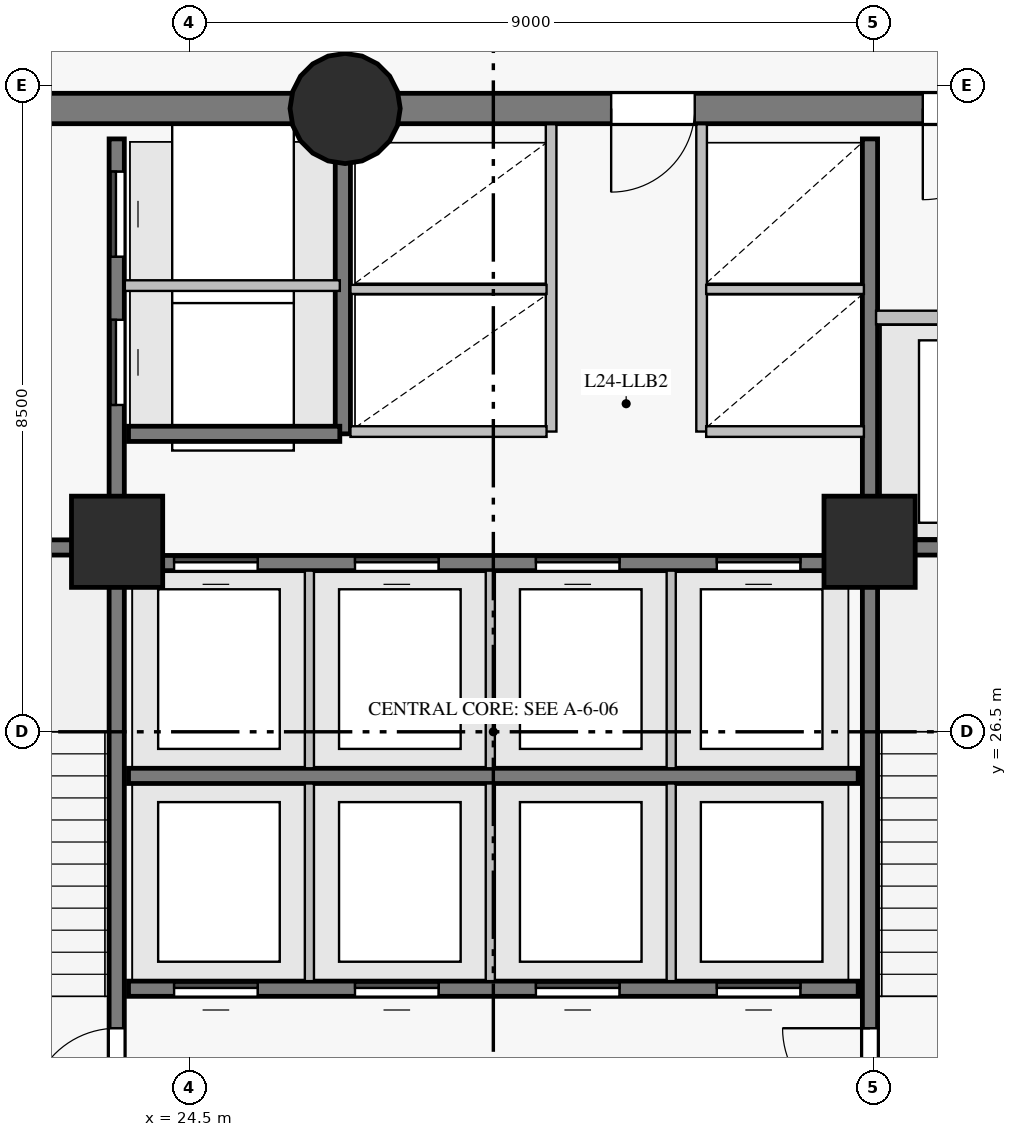
"""IFC4 building model, lengths in metres.
Left out: names, types, materials, properties, quantities, classifications, styles, units other than length and angle.
Written with IfcOpenShell. Run it as: python <this file> out.ifc"""

import sys

from ifc_helpers import new_model, si_unit, direction, frame, frame_2d, origin, origin_with_axes, origin_2d, place, context, subcontext, project, spatial, rectangle, circle, extrude, source, transform, mapped, element, fill, save


model = new_model("IFC4")
c1 = context("Model", 3, precision=1e-05, world=origin(), true_north=direction((0.0, 1.0)))
c2 = subcontext(c1, "Body", "Model", "MODEL_VIEW")
j1 = project(units=[si_unit("LENGTHUNIT", "METRE"), si_unit("PLANEANGLEUNIT", "RADIAN")], contexts=[c1])
p1 = place(None, origin())
s1 = spatial("IfcSite", under=j1, at=p1, CompositionType="ELEMENT")
p2 = place(p1, origin())
s2 = spatial("IfcBuilding", under=s1, at=p2, CompositionType="ELEMENT")
p3 = place(p2, frame((0.0, 0.0, 92.2)))
s3 = spatial("IfcBuildingStorey", under=s2, at=p3, CompositionType="ELEMENT", Elevation=92.2)
p4 = place(p3, frame((37.5, 34.7, 0.0), z_axis=(0.0, 0.0, 1.0), x_axis=(-1.0, 0.0, 0.0)))
e1 = element("IfcWall", 1, at=p4, inside=s3, PredefinedType="SHEAR", context=c2, shape_type="SweptSolid", body=[
    extrude(rectangle(XDim=10.95, YDim=0.4, at=frame_2d((5.475, 0.0))), origin(), (0.0, 0.0, 1.0), 3.775),
])
p5 = place(p4, frame((2.15, 0.0, 0.0)))
e2 = element("IfcOpeningElement", 2, at=p5, cuts=e1, PredefinedType="OPENING", context=c2, shape_type="SweptSolid", body=[
    extrude(rectangle(XDim=1.2, YDim=2.15, at=frame_2d((0.6, 1.075))), frame((0.0, 0.21, 0.0), z_axis=(0.0, -1.0, 0.0), x_axis=(1.0, 0.0, 0.0)), (0.0, 0.0, 1.0), 0.42),
])
p6 = place(p4, frame((6.35, 0.0, 0.0)))
e3 = element("IfcOpeningElement", 3, at=p6, cuts=e1, PredefinedType="OPENING", context=c2, shape_type="SweptSolid", body=[
    extrude(rectangle(XDim=1.1, YDim=2.15, at=frame_2d((0.55, 1.075))), frame((0.0, 0.21, 0.0), z_axis=(0.0, -1.0, 0.0), x_axis=(1.0, 0.0, 0.0)), (0.0, 0.0, 1.0), 0.42),
])
p7 = place(p3, frame((26.55, 34.7, 0.0), z_axis=(0.0, 0.0, 1.0), x_axis=(-1.0, 0.0, 0.0)))
e4 = element("IfcWall", 4, at=p7, inside=s3, PredefinedType="SHEAR", context=c2, shape_type="SweptSolid", body=[
    extrude(rectangle(XDim=7.05, YDim=0.4, at=frame_2d((3.525, 0.0))), origin(), (0.0, 0.0, 1.0), 3.775),
])
p8 = place(p7, frame((4.25, 0.0, 0.0)))
e5 = element("IfcOpeningElement", 5, at=p8, cuts=e4, PredefinedType="OPENING", context=c2, shape_type="SweptSolid", body=[
    extrude(rectangle(XDim=1.1, YDim=2.15, at=frame_2d((0.55, 1.075))), frame((0.0, 0.21, 0.0), z_axis=(0.0, -1.0, 0.0), x_axis=(1.0, 0.0, 0.0)), (0.0, 0.0, 1.0), 0.42),
])
m1 = source(origin_with_axes(), c2, "Body", "SweptSolid", [
    extrude(circle(Radius=0.725, at=origin_2d()), origin(), (0.0, 0.0, 1.0), 4.0),
])
p9 = place(p3, frame((26.55, 34.7, 0.0), z_axis=(0.0, 0.0, 1.0), x_axis=(1.0, 0.0, 0.0)))
e6 = element("IfcColumn", 6, at=p9, inside=s3, PredefinedType="COLUMN", context=c2, shape_type="MappedRepresentation", body=[
    mapped(m1, transform((0.0, 0.0, 0.0), scale=1.0)),
])
m2 = source(origin_with_axes(), c2, "Body", "SweptSolid", [
    extrude(rectangle(XDim=1.2, YDim=1.2, at=origin_2d()), origin(), (0.0, 0.0, 1.0), 4.0),
])
for number, where, z_axis, x_axis in (
    (7, (23.55, 29.0, 0.0), (0.0, 0.0, 1.0), (1.0, 0.0, 0.0)),
    (8, (33.45, 29.0, 0.0), (0.0, 0.0, 1.0), (1.0, 0.0, 0.0)),
):
    element("IfcColumn", number, at=place(p3, frame(where, z_axis=z_axis, x_axis=x_axis)), inside=s3, PredefinedType="COLUMN", context=c2, shape_type="MappedRepresentation", body=[
        mapped(m2, transform((0.0, 0.0, 0.0), scale=1.0)),
    ])
p10 = place(p3, frame((23.545, 18.7, 0.0), z_axis=(0.0, 0.0, 1.0), x_axis=(0.0, 1.0, 0.0)))
e9 = element("IfcWall", 9, at=p10, inside=s3, PredefinedType="SHEAR", context=c2, shape_type="SweptSolid", body=[
    extrude(rectangle(XDim=15.6, YDim=0.2, at=frame_2d((7.8, 0.0))), origin(), (0.0, 0.0, 1.0), 3.775),
])
p11 = place(p10, frame((2.75, 0.0, 0.0)))
e10 = element("IfcOpeningElement", 10, at=p11, cuts=e9, PredefinedType="OPENING", context=c2, shape_type="SweptSolid", body=[
    extrude(rectangle(XDim=1.15, YDim=2.15, at=frame_2d((0.575, 1.075))), frame((0.0, 0.11, 0.0), z_axis=(0.0, -1.0, 0.0), x_axis=(1.0, 0.0, 0.0)), (0.0, 0.0, 1.0), 0.22),
])
p12 = place(p10, frame((0.14, 0.0, 0.0)))
e11 = element("IfcOpeningElement", 11, at=p12, cuts=e9, PredefinedType="OPENING", context=c2, shape_type="SweptSolid", body=[
    extrude(rectangle(XDim=0.88, YDim=2.1, at=frame_2d((0.44, 1.05))), frame((0.0, 0.11, 0.0), z_axis=(0.0, -1.0, 0.0), x_axis=(1.0, 0.0, 0.0)), (0.0, 0.0, 1.0), 0.22),
])
p13 = place(p10, frame((1.36, 0.0, 0.0)))
e12 = element("IfcOpeningElement", 12, at=p13, cuts=e9, PredefinedType="OPENING", context=c2, shape_type="SweptSolid", body=[
    extrude(rectangle(XDim=0.88, YDim=2.1, at=frame_2d((0.44, 1.05))), frame((0.0, 0.11, 0.0), z_axis=(0.0, -1.0, 0.0), x_axis=(1.0, 0.0, 0.0)), (0.0, 0.0, 1.0), 0.22),
])
p14 = place(p10, frame((12.1, 0.0, 0.0)))
e13 = element("IfcOpeningElement", 13, at=p14, cuts=e9, PredefinedType="OPENING", context=c2, shape_type="SweptSolid", body=[
    extrude(rectangle(XDim=1.12, YDim=2.15, at=frame_2d((0.56, 1.075))), frame((0.0, 0.11, 0.0), z_axis=(0.0, -1.0, 0.0), x_axis=(1.0, 0.0, 0.0)), (0.0, 0.0, 1.0), 0.22),
])
p15 = place(p10, frame((14.05, 0.0, 0.0)))
e14 = element("IfcOpeningElement", 14, at=p15, cuts=e9, PredefinedType="OPENING", context=c2, shape_type="SweptSolid", body=[
    extrude(rectangle(XDim=1.12, YDim=2.15, at=frame_2d((0.56, 1.075))), frame((0.0, 0.11, 0.0), z_axis=(0.0, -1.0, 0.0), x_axis=(1.0, 0.0, 0.0)), (0.0, 0.0, 1.0), 0.22),
])
p16 = place(p3, frame((33.455, 18.7, 0.0), z_axis=(0.0, 0.0, 1.0), x_axis=(0.0, 1.0, 0.0)))
e15 = element("IfcWall", 15, at=p16, inside=s3, PredefinedType="SHEAR", context=c2, shape_type="SweptSolid", body=[
    extrude(rectangle(XDim=15.6, YDim=0.2, at=frame_2d((7.8, 0.0))), origin(), (0.0, 0.0, 1.0), 3.775),
])
p17 = place(p16, frame((2.75, 0.0, 0.0)))
e16 = element("IfcOpeningElement", 16, at=p17, cuts=e15, PredefinedType="OPENING", context=c2, shape_type="SweptSolid", body=[
    extrude(rectangle(XDim=1.15, YDim=2.15, at=frame_2d((0.575, 1.075))), frame((0.0, 0.11, 0.0), z_axis=(0.0, -1.0, 0.0), x_axis=(1.0, 0.0, 0.0)), (0.0, 0.0, 1.0), 0.22),
])
p18 = place(p16, frame((0.55, 0.0, 0.0)))
e17 = element("IfcOpeningElement", 17, at=p18, cuts=e15, PredefinedType="OPENING", context=c2, shape_type="SweptSolid", body=[
    extrude(rectangle(XDim=0.94, YDim=2.1, at=frame_2d((0.47, 1.05))), frame((0.0, 0.11, 0.0), z_axis=(0.0, -1.0, 0.0), x_axis=(1.0, 0.0, 0.0)), (0.0, 0.0, 1.0), 0.22),
])
p19 = place(p3, frame((23.7, 23.12, 0.0), z_axis=(0.0, 0.0, 1.0), x_axis=(1.0, 0.0, 0.0)))
e18 = element("IfcWall", 18, at=p19, inside=s3, PredefinedType="SHEAR", context=c2, shape_type="SweptSolid", body=[
    extrude(rectangle(XDim=9.6, YDim=0.2, at=frame_2d((4.8, 0.0))), origin(), (0.0, 0.0, 1.0), 3.775),
])
p20 = place(p19, frame((0.6, 0.0, 0.0)))
e19 = element("IfcOpeningElement", 19, at=p20, cuts=e18, PredefinedType="OPENING", context=c2, shape_type="SweptSolid", body=[
    extrude(rectangle(XDim=1.1, YDim=2.15, at=frame_2d((0.55, 1.075))), frame((0.0, 0.11, 0.0), z_axis=(0.0, -1.0, 0.0), x_axis=(1.0, 0.0, 0.0)), (0.0, 0.0, 1.0), 0.22),
])
p21 = place(p19, frame((2.98, 0.0, 0.0)))
e20 = element("IfcOpeningElement", 20, at=p21, cuts=e18, PredefinedType="OPENING", context=c2, shape_type="SweptSolid", body=[
    extrude(rectangle(XDim=1.1, YDim=2.15, at=frame_2d((0.55, 1.075))), frame((0.0, 0.11, 0.0), z_axis=(0.0, -1.0, 0.0), x_axis=(1.0, 0.0, 0.0)), (0.0, 0.0, 1.0), 0.22),
])
p22 = place(p19, frame((5.36, 0.0, 0.0)))
e21 = element("IfcOpeningElement", 21, at=p22, cuts=e18, PredefinedType="OPENING", context=c2, shape_type="SweptSolid", body=[
    extrude(rectangle(XDim=1.1, YDim=2.15, at=frame_2d((0.55, 1.075))), frame((0.0, 0.11, 0.0), z_axis=(0.0, -1.0, 0.0), x_axis=(1.0, 0.0, 0.0)), (0.0, 0.0, 1.0), 0.22),
])
p23 = place(p19, frame((7.74, 0.0, 0.0)))
e22 = element("IfcOpeningElement", 22, at=p23, cuts=e18, PredefinedType="OPENING", context=c2, shape_type="SweptSolid", body=[
    extrude(rectangle(XDim=1.1, YDim=2.15, at=frame_2d((0.55, 1.075))), frame((0.0, 0.11, 0.0), z_axis=(0.0, -1.0, 0.0), x_axis=(1.0, 0.0, 0.0)), (0.0, 0.0, 1.0), 0.22),
])
p24 = place(p3, frame((23.7, 25.92, 0.0), z_axis=(0.0, 0.0, 1.0), x_axis=(1.0, 0.0, 0.0)))
e23 = element("IfcWall", 23, at=p24, inside=s3, PredefinedType="SHEAR", context=c2, shape_type="SweptSolid", body=[
    extrude(rectangle(XDim=9.6, YDim=0.2, at=frame_2d((4.8, 0.0))), origin(), (0.0, 0.0, 1.0), 3.775),
])
p25 = place(p3, frame((23.7, 28.72, 0.0), z_axis=(0.0, 0.0, 1.0), x_axis=(1.0, 0.0, 0.0)))
e24 = element("IfcWall", 24, at=p25, inside=s3, PredefinedType="SHEAR", context=c2, shape_type="SweptSolid", body=[
    extrude(rectangle(XDim=9.6, YDim=0.2, at=frame_2d((4.8, 0.0))), origin(), (0.0, 0.0, 1.0), 3.775),
])
p26 = place(p25, frame((0.6, 0.0, 0.0)))
e25 = element("IfcOpeningElement", 25, at=p26, cuts=e24, PredefinedType="OPENING", context=c2, shape_type="SweptSolid", body=[
    extrude(rectangle(XDim=1.1, YDim=2.15, at=frame_2d((0.55, 1.075))), frame((0.0, 0.11, 0.0), z_axis=(0.0, -1.0, 0.0), x_axis=(1.0, 0.0, 0.0)), (0.0, 0.0, 1.0), 0.22),
])
p27 = place(p25, frame((2.98, 0.0, 0.0)))
e26 = element("IfcOpeningElement", 26, at=p27, cuts=e24, PredefinedType="OPENING", context=c2, shape_type="SweptSolid", body=[
    extrude(rectangle(XDim=1.1, YDim=2.15, at=frame_2d((0.55, 1.075))), frame((0.0, 0.11, 0.0), z_axis=(0.0, -1.0, 0.0), x_axis=(1.0, 0.0, 0.0)), (0.0, 0.0, 1.0), 0.22),
])
p28 = place(p25, frame((5.36, 0.0, 0.0)))
e27 = element("IfcOpeningElement", 27, at=p28, cuts=e24, PredefinedType="OPENING", context=c2, shape_type="SweptSolid", body=[
    extrude(rectangle(XDim=1.1, YDim=2.15, at=frame_2d((0.55, 1.075))), frame((0.0, 0.11, 0.0), z_axis=(0.0, -1.0, 0.0), x_axis=(1.0, 0.0, 0.0)), (0.0, 0.0, 1.0), 0.22),
])
p29 = place(p25, frame((7.74, 0.0, 0.0)))
e28 = element("IfcOpeningElement", 28, at=p29, cuts=e24, PredefinedType="OPENING", context=c2, shape_type="SweptSolid", body=[
    extrude(rectangle(XDim=1.1, YDim=2.15, at=frame_2d((0.55, 1.075))), frame((0.0, 0.11, 0.0), z_axis=(0.0, -1.0, 0.0), x_axis=(1.0, 0.0, 0.0)), (0.0, 0.0, 1.0), 0.22),
])
for number, where, z_axis, x_axis in (
    (29, (33.455, 28.925, 0.0), (0.0, 0.0, 1.0), (1.0, 0.0, 0.0)),
    (30, (19.55, 28.925, 0.0), (0.0, 0.0, 1.0), (1.0, 0.0, 0.0)),
):
    element("IfcWall", number, at=place(p3, frame(where, z_axis=z_axis, x_axis=x_axis)), inside=s3, PredefinedType="SHEAR", context=c2, shape_type="SweptSolid", body=[
        extrude(rectangle(XDim=3.995, YDim=0.2, at=frame_2d((1.998, 0.0))), origin(), (0.0, 0.0, 1.0), 3.775),
    ])
p30 = place(p3, frame((26.52, 30.42, 0.0), z_axis=(0.0, 0.0, 1.0), x_axis=(0.0, 1.0, 0.0)))
e31 = element("IfcWall", 31, at=p30, inside=s3, PredefinedType="SHEAR", context=c2, shape_type="SweptSolid", body=[
    extrude(rectangle(XDim=3.86, YDim=0.2, at=frame_2d((1.93, 0.0))), origin(), (0.0, 0.0, 1.0), 3.775),
])
p31 = place(p3, frame((23.7, 30.42, 0.0), z_axis=(0.0, 0.0, 1.0), x_axis=(1.0, 0.0, 0.0)))
e32 = element("IfcWall", 32, at=p31, inside=s3, PredefinedType="SHEAR", context=c2, shape_type="SweptSolid", body=[
    extrude(rectangle(XDim=2.78, YDim=0.2, at=frame_2d((1.39, 0.0))), origin(), (0.0, 0.0, 1.0), 3.775),
])
for number, where, z_axis, x_axis in (
    (33, (29.26, 30.45, 0.0), (0.0, 0.0, 1.0), (0.0, 1.0, 0.0)),
    (34, (31.24, 30.45, 0.0), (0.0, 0.0, 1.0), (0.0, 1.0, 0.0)),
):
    element("IfcWall", number, at=place(p3, frame(where, z_axis=z_axis, x_axis=x_axis)), inside=s3, PredefinedType="PARTITIONING", context=c2, shape_type="SweptSolid", body=[
        extrude(rectangle(XDim=4.043, YDim=0.14, at=frame_2d((2.021, 0.0))), origin(), (0.0, 0.0, 1.0), 3.775),
    ])
p32 = place(p3, frame((33.535, 31.95, 0.0), z_axis=(0.0, 0.0, 1.0), x_axis=(1.0, 0.0, 0.0)))
e35 = element("IfcWall", 35, at=p32, inside=s3, PredefinedType="PARTITIONING", context=c2, shape_type="SweptSolid", body=[
    extrude(rectangle(XDim=3.759, YDim=0.18, at=frame_2d((1.879, 0.0))), origin(), (0.0, 0.0, 1.0), 3.775),
])
p33 = place(p32, frame((0.9, 0.0, 0.0)))
e36 = element("IfcOpeningElement", 36, at=p33, cuts=e35, PredefinedType="OPENING", context=c2, shape_type="SweptSolid", body=[
    extrude(rectangle(XDim=1.3, YDim=2.2, at=frame_2d((0.65, 1.1))), frame((0.0, 0.1, 0.0), z_axis=(0.0, -1.0, 0.0), x_axis=(1.0, 0.0, 0.0)), (0.0, 0.0, 1.0), 0.2),
])
p34 = place(p3, frame((23.652, 32.37, 0.0), z_axis=(0.0, 0.0, 1.0), x_axis=(1.0, 0.0, 0.0)))
e37 = element("IfcWall", 37, at=p34, inside=s3, PredefinedType="PARTITIONING", context=c2, shape_type="SweptSolid", body=[
    extrude(rectangle(XDim=2.828, YDim=0.14, at=frame_2d((1.414, 0.0))), origin(), (0.0, 0.0, 1.0), 3.775),
])
for number, where, z_axis, x_axis in (
    (38, (26.08, 23.22, 0.0), (0.0, 0.0, 1.0), (0.0, 1.0, 0.0)),
    (39, (28.46, 23.22, 0.0), (0.0, 0.0, 1.0), (0.0, 1.0, 0.0)),
    (40, (30.84, 23.22, 0.0), (0.0, 0.0, 1.0), (0.0, 1.0, 0.0)),
    (41, (26.08, 26.02, 0.0), (0.0, 0.0, 1.0), (0.0, 1.0, 0.0)),
    (42, (28.46, 26.02, 0.0), (0.0, 0.0, 1.0), (0.0, 1.0, 0.0)),
    (43, (30.84, 26.02, 0.0), (0.0, 0.0, 1.0), (0.0, 1.0, 0.0)),
):
    element("IfcWall", number, at=place(p3, frame(where, z_axis=z_axis, x_axis=x_axis)), inside=s3, PredefinedType="PARTITIONING", context=c2, shape_type="SweptSolid", body=[
        extrude(rectangle(XDim=2.6, YDim=0.12, at=frame_2d((1.3, 0.0))), origin(), (0.0, 0.0, 1.0), 3.775),
    ])
p35 = place(p3, frame((26.62, 30.45, 0.0), z_axis=(0.0, 0.0, 1.0), x_axis=(1.0, 0.0, 0.0)))
e44 = element("IfcWall", 44, at=p35, inside=s3, PredefinedType="PARTITIONING", context=c2, shape_type="SweptSolid", body=[
    extrude(rectangle(XDim=2.58, YDim=0.14, at=frame_2d((1.29, 0.0))), origin(), (0.0, 0.0, 1.0), 3.775),
])
p36 = place(p3, frame((26.62, 32.32, 0.0), z_axis=(0.0, 0.0, 1.0), x_axis=(1.0, 0.0, 0.0)))
e45 = element("IfcWall", 45, at=p36, inside=s3, PredefinedType="PARTITIONING", context=c2, shape_type="SweptSolid", body=[
    extrude(rectangle(XDim=2.58, YDim=0.12, at=frame_2d((1.29, 0.0))), origin(), (0.0, 0.0, 1.0), 3.775),
])
p37 = place(p3, frame((31.3, 30.45, 0.0), z_axis=(0.0, 0.0, 1.0), x_axis=(1.0, 0.0, 0.0)))
e46 = element("IfcWall", 46, at=p37, inside=s3, PredefinedType="PARTITIONING", context=c2, shape_type="SweptSolid", body=[
    extrude(rectangle(XDim=2.075, YDim=0.14, at=frame_2d((1.038, 0.0))), origin(), (0.0, 0.0, 1.0), 3.775),
])
p38 = place(p3, frame((31.3, 32.32, 0.0), z_axis=(0.0, 0.0, 1.0), x_axis=(1.0, 0.0, 0.0)))
e47 = element("IfcWall", 47, at=p38, inside=s3, PredefinedType="PARTITIONING", context=c2, shape_type="SweptSolid", body=[
    extrude(rectangle(XDim=2.075, YDim=0.12, at=frame_2d((1.038, 0.0))), origin(), (0.0, 0.0, 1.0), 3.775),
])
m3 = source(origin_with_axes(), c2, "Body", "SweptSolid", [
    extrude(rectangle(XDim=1.15, YDim=2.15, at=frame_2d((0.575, 1.075))), frame((0.0, 0.025, 0.0), z_axis=(0.0, -1.0, 0.0), x_axis=(1.0, 0.0, 0.0)), (0.0, 0.0, 1.0), 0.05),
])
p39 = place(p11, origin())
e48 = element("IfcDoor", 48, at=p39, inside=s3, OperationType="SINGLE_SWING_LEFT", PredefinedType="DOOR", context=c2, shape_type="MappedRepresentation", body=[
    mapped(m3, transform((0.0, 0.0, 0.0), scale=1.0)),
])
fill(e10, e48)
p40 = place(p17, origin())
e49 = element("IfcDoor", 49, at=p40, inside=s3, OperationType="SINGLE_SWING_RIGHT", PredefinedType="DOOR", context=c2, shape_type="MappedRepresentation", body=[
    mapped(m3, transform((0.0, 0.0, 0.0), scale=1.0)),
])
fill(e16, e49)
m4 = source(origin_with_axes(), c2, "Body", "SweptSolid", [
    extrude(rectangle(XDim=1.2, YDim=2.15, at=frame_2d((0.6, 1.075))), frame((0.0, 0.025, 0.0), z_axis=(0.0, -1.0, 0.0), x_axis=(1.0, 0.0, 0.0)), (0.0, 0.0, 1.0), 0.05),
])
p41 = place(p5, origin())
e50 = element("IfcDoor", 50, at=p41, inside=s3, OperationType="SINGLE_SWING_RIGHT", PredefinedType="DOOR", context=c2, shape_type="MappedRepresentation", body=[
    mapped(m4, transform((0.0, 0.0, 0.0), scale=1.0)),
])
fill(e2, e50)
m5 = source(origin_with_axes(), c2, "Body", "SweptSolid", [
    extrude(rectangle(XDim=1.1, YDim=2.15, at=frame_2d((0.55, 1.075))), frame((0.0, 0.025, 0.0), z_axis=(0.0, -1.0, 0.0), x_axis=(1.0, 0.0, 0.0)), (0.0, 0.0, 1.0), 0.05),
])
p42 = place(p20, origin())
e51 = element("IfcDoor", 51, at=p42, inside=s3, OperationType="SLIDING_TO_LEFT", PredefinedType="DOOR", context=c2, shape_type="MappedRepresentation", body=[
    mapped(m5, transform((0.0, 0.0, 0.0), scale=1.0)),
])
fill(e19, e51)
p43 = place(p21, origin())
e52 = element("IfcDoor", 52, at=p43, inside=s3, OperationType="SLIDING_TO_RIGHT", PredefinedType="DOOR", context=c2, shape_type="MappedRepresentation", body=[
    mapped(m5, transform((0.0, 0.0, 0.0), scale=1.0)),
])
fill(e20, e52)
p44 = place(p22, origin())
e53 = element("IfcDoor", 53, at=p44, inside=s3, OperationType="SLIDING_TO_LEFT", PredefinedType="DOOR", context=c2, shape_type="MappedRepresentation", body=[
    mapped(m5, transform((0.0, 0.0, 0.0), scale=1.0)),
])
fill(e21, e53)
p45 = place(p23, origin())
e54 = element("IfcDoor", 54, at=p45, inside=s3, OperationType="SLIDING_TO_RIGHT", PredefinedType="DOOR", context=c2, shape_type="MappedRepresentation", body=[
    mapped(m5, transform((0.0, 0.0, 0.0), scale=1.0)),
])
fill(e22, e54)
p46 = place(p26, origin())
e55 = element("IfcDoor", 55, at=p46, inside=s3, OperationType="SLIDING_TO_LEFT", PredefinedType="DOOR", context=c2, shape_type="MappedRepresentation", body=[
    mapped(m5, transform((0.0, 0.0, 0.0), scale=1.0)),
])
fill(e25, e55)
p47 = place(p27, origin())
e56 = element("IfcDoor", 56, at=p47, inside=s3, OperationType="SLIDING_TO_RIGHT", PredefinedType="DOOR", context=c2, shape_type="MappedRepresentation", body=[
    mapped(m5, transform((0.0, 0.0, 0.0), scale=1.0)),
])
fill(e26, e56)
p48 = place(p28, origin())
e57 = element("IfcDoor", 57, at=p48, inside=s3, OperationType="SLIDING_TO_LEFT", PredefinedType="DOOR", context=c2, shape_type="MappedRepresentation", body=[
    mapped(m5, transform((0.0, 0.0, 0.0), scale=1.0)),
])
fill(e27, e57)
p49 = place(p29, origin())
e58 = element("IfcDoor", 58, at=p49, inside=s3, OperationType="SLIDING_TO_RIGHT", PredefinedType="DOOR", context=c2, shape_type="MappedRepresentation", body=[
    mapped(m5, transform((0.0, 0.0, 0.0), scale=1.0)),
])
fill(e28, e58)
p50 = place(p6, origin())
e59 = element("IfcDoor", 59, at=p50, inside=s3, OperationType="SINGLE_SWING_RIGHT", PredefinedType="DOOR", context=c2, shape_type="MappedRepresentation", body=[
    mapped(m5, transform((0.0, 0.0, 0.0), scale=1.0)),
])
fill(e3, e59)
m6 = source(origin_with_axes(), c2, "Body", "SweptSolid", [
    extrude(rectangle(XDim=1.12, YDim=2.15, at=frame_2d((0.56, 1.075))), frame((0.0, 0.025, 0.0), z_axis=(0.0, -1.0, 0.0), x_axis=(1.0, 0.0, 0.0)), (0.0, 0.0, 1.0), 0.05),
])
p51 = place(p14, origin())
e60 = element("IfcDoor", 60, at=p51, inside=s3, OperationType="SLIDING_TO_LEFT", PredefinedType="DOOR", context=c2, shape_type="MappedRepresentation", body=[
    mapped(m6, transform((0.0, 0.0, 0.0), scale=1.0)),
])
fill(e13, e60)
p52 = place(p15, origin())
e61 = element("IfcDoor", 61, at=p52, inside=s3, OperationType="SLIDING_TO_RIGHT", PredefinedType="DOOR", context=c2, shape_type="MappedRepresentation", body=[
    mapped(m6, transform((0.0, 0.0, 0.0), scale=1.0)),
])
fill(e14, e61)
save(model, sys.argv[1])
